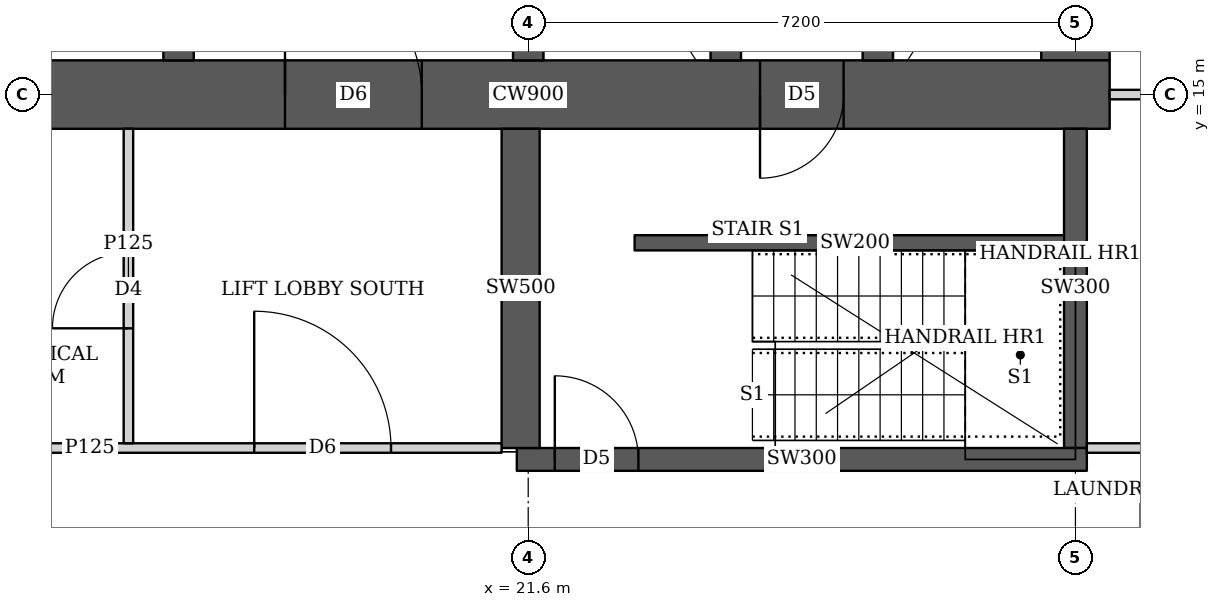
"""IFC4 building model, lengths in metres.
Left out: names, types, materials, properties, quantities, classifications, styles, units other than length and angle.
Written with IfcOpenShell. Run it as: python <this file> out.ifc"""

import sys

from ifc_helpers import new_model, si_unit, direction, frame, frame_2d, origin, place, context, subcontext, project, spatial, rectangle, extrude, element, fill, save


model = new_model("IFC4")
c1 = context("Model", 3, precision=1e-05, world=origin(), true_north=direction((0.0, 1.0)))
c2 = subcontext(c1, "Body", "Model", "MODEL_VIEW")
j1 = project(units=[si_unit("LENGTHUNIT", "METRE"), si_unit("PLANEANGLEUNIT", "RADIAN")], contexts=[c1])
p1 = place(None, origin())
s1 = spatial("IfcSite", under=j1, at=p1, CompositionType="ELEMENT")
p2 = place(p1, origin())
s2 = spatial("IfcBuilding", under=s1, at=p2, CompositionType="ELEMENT")
p3 = place(p2, frame((0.0, 0.0, 139.55)))
s3 = spatial("IfcBuildingStorey", under=s2, at=p3, CompositionType="ELEMENT", Elevation=139.55)
p4 = place(p3, frame((13.95, 15.0, 0.0), z_axis=(0.0, 0.0, 1.0), x_axis=(1.0, 0.0, 0.0)))
e1 = element("IfcWall", 1, at=p4, inside=s3, PredefinedType="SHEAR", context=c2, shape_type="SweptSolid", body=[
    extrude(rectangle(XDim=15.3, YDim=0.9, at=frame_2d((7.65, 0.0))), origin(), (0.0, 0.0, 1.0), 3.75),
])
p5 = place(p4, frame((4.45, 0.0, 0.0)))
e2 = element("IfcOpeningElement", 2, at=p5, cuts=e1, PredefinedType="OPENING", context=c2, shape_type="SweptSolid", body=[
    extrude(rectangle(XDim=1.8, YDim=2.1, at=frame_2d((0.9, 1.05))), frame((0.0, 0.46, 0.0), z_axis=(0.0, -1.0, 0.0), x_axis=(1.0, 0.0, 0.0)), (0.0, 0.0, 1.0), 0.92),
])
p6 = place(p4, frame((10.7, 0.0, 0.0)))
e3 = element("IfcOpeningElement", 3, at=p6, cuts=e1, PredefinedType="OPENING", context=c2, shape_type="SweptSolid", body=[
    extrude(rectangle(XDim=1.1, YDim=2.1, at=frame_2d((0.55, 1.05))), frame((0.0, 0.46, 0.0), z_axis=(0.0, -1.0, 0.0), x_axis=(1.0, 0.0, 0.0)), (0.0, 0.0, 1.0), 0.92),
])
p7 = place(p3, frame((28.8, 15.45, 0.0), z_axis=(0.0, 0.0, 1.0), x_axis=(0.0, 1.0, 0.0)))
e4 = element("IfcWall", 4, at=p7, inside=s3, PredefinedType="SHEAR", context=c2, shape_type="SweptSolid", body=[
    extrude(rectangle(XDim=14.1, YDim=0.9, at=frame_2d((7.05, 0.0))), origin(), (0.0, 0.0, 1.0), 3.75),
])
p8 = place(p3, frame((17.0, 15.45, 0.0), z_axis=(0.0, 0.0, 1.0), x_axis=(0.0, 1.0, 0.0)))
e5 = element("IfcWall", 5, at=p8, inside=s3, PredefinedType="SHEAR", context=c2, shape_type="SweptSolid", body=[
    extrude(rectangle(XDim=14.1, YDim=0.4, at=frame_2d((7.05, 0.0))), origin(), (0.0, 0.0, 1.0), 3.75),
])
p9 = place(p8, frame((0.925, 0.0, 0.0)))
e6 = element("IfcOpeningElement", 6, at=p9, cuts=e5, PredefinedType="OPENING", context=c2, shape_type="SweptSolid", body=[
    extrude(rectangle(XDim=1.0, YDim=2.1, at=frame_2d((0.5, 1.05))), frame((0.0, 0.21, 0.0), z_axis=(0.0, -1.0, 0.0), x_axis=(1.0, 0.0, 0.0)), (0.0, 0.0, 1.0), 0.42),
])
p10 = place(p8, frame((4.675, 0.0, 0.0)))
e7 = element("IfcOpeningElement", 7, at=p10, cuts=e5, PredefinedType="OPENING", context=c2, shape_type="SweptSolid", body=[
    extrude(rectangle(XDim=1.0, YDim=2.1, at=frame_2d((0.5, 1.05))), frame((0.0, 0.21, 0.0), z_axis=(0.0, -1.0, 0.0), x_axis=(1.0, 0.0, 0.0)), (0.0, 0.0, 1.0), 0.42),
])
p11 = place(p8, frame((8.425, 0.0, 0.0)))
e8 = element("IfcOpeningElement", 8, at=p11, cuts=e5, PredefinedType="OPENING", context=c2, shape_type="SweptSolid", body=[
    extrude(rectangle(XDim=1.0, YDim=2.1, at=frame_2d((0.5, 1.05))), frame((0.0, 0.21, 0.0), z_axis=(0.0, -1.0, 0.0), x_axis=(1.0, 0.0, 0.0)), (0.0, 0.0, 1.0), 0.42),
])
p12 = place(p8, frame((12.175, 0.0, 0.0)))
e9 = element("IfcOpeningElement", 9, at=p12, cuts=e5, PredefinedType="OPENING", context=c2, shape_type="SweptSolid", body=[
    extrude(rectangle(XDim=1.0, YDim=2.1, at=frame_2d((0.5, 1.05))), frame((0.0, 0.21, 0.0), z_axis=(0.0, -1.0, 0.0), x_axis=(1.0, 0.0, 0.0)), (0.0, 0.0, 1.0), 0.42),
])
p13 = place(p3, frame((21.6, 15.45, 0.0), z_axis=(0.0, 0.0, 1.0), x_axis=(0.0, 1.0, 0.0)))
e10 = element("IfcWall", 10, at=p13, inside=s3, PredefinedType="SHEAR", context=c2, shape_type="SweptSolid", body=[
    extrude(rectangle(XDim=14.1, YDim=0.4, at=frame_2d((7.05, 0.0))), origin(), (0.0, 0.0, 1.0), 3.75),
])
p14 = place(p13, frame((0.875, 0.0, 0.0)))
e11 = element("IfcOpeningElement", 11, at=p14, cuts=e10, PredefinedType="OPENING", context=c2, shape_type="SweptSolid", body=[
    extrude(rectangle(XDim=1.1, YDim=2.1, at=frame_2d((0.55, 1.05))), frame((0.0, 0.21, 0.0), z_axis=(0.0, -1.0, 0.0), x_axis=(1.0, 0.0, 0.0)), (0.0, 0.0, 1.0), 0.42),
])
p15 = place(p13, frame((4.625, 0.0, 0.0)))
e12 = element("IfcOpeningElement", 12, at=p15, cuts=e10, PredefinedType="OPENING", context=c2, shape_type="SweptSolid", body=[
    extrude(rectangle(XDim=1.1, YDim=2.1, at=frame_2d((0.55, 1.05))), frame((0.0, 0.21, 0.0), z_axis=(0.0, -1.0, 0.0), x_axis=(1.0, 0.0, 0.0)), (0.0, 0.0, 1.0), 0.42),
])
p16 = place(p13, frame((8.375, 0.0, 0.0)))
e13 = element("IfcOpeningElement", 13, at=p16, cuts=e10, PredefinedType="OPENING", context=c2, shape_type="SweptSolid", body=[
    extrude(rectangle(XDim=1.1, YDim=2.1, at=frame_2d((0.55, 1.05))), frame((0.0, 0.21, 0.0), z_axis=(0.0, -1.0, 0.0), x_axis=(1.0, 0.0, 0.0)), (0.0, 0.0, 1.0), 0.42),
])
p17 = place(p13, frame((12.125, 0.0, 0.0)))
e14 = element("IfcOpeningElement", 14, at=p17, cuts=e10, PredefinedType="OPENING", context=c2, shape_type="SweptSolid", body=[
    extrude(rectangle(XDim=1.1, YDim=2.1, at=frame_2d((0.55, 1.05))), frame((0.0, 0.21, 0.0), z_axis=(0.0, -1.0, 0.0), x_axis=(1.0, 0.0, 0.0)), (0.0, 0.0, 1.0), 0.42),
])
p18 = place(p3, frame((24.2, 15.45, 0.0), z_axis=(0.0, 0.0, 1.0), x_axis=(0.0, 1.0, 0.0)))
e15 = element("IfcWall", 15, at=p18, inside=s3, PredefinedType="SHEAR", context=c2, shape_type="SweptSolid", body=[
    extrude(rectangle(XDim=14.1, YDim=0.4, at=frame_2d((7.05, 0.0))), origin(), (0.0, 0.0, 1.0), 3.75),
])
p19 = place(p3, frame((26.2, 15.45, 0.0), z_axis=(0.0, 0.0, 1.0), x_axis=(0.0, 1.0, 0.0)))
e16 = element("IfcWall", 16, at=p19, inside=s3, PredefinedType="SHEAR", context=c2, shape_type="SweptSolid", body=[
    extrude(rectangle(XDim=3.1, YDim=0.4, at=frame_2d((1.55, 0.0))), origin(), (0.0, 0.0, 1.0), 3.75),
])
p20 = place(p19, frame((0.825, 0.0, 0.0)))
e17 = element("IfcOpeningElement", 17, at=p20, cuts=e16, PredefinedType="OPENING", context=c2, shape_type="SweptSolid", body=[
    extrude(rectangle(XDim=1.2, YDim=2.1, at=frame_2d((0.6, 1.05))), frame((0.0, 0.21, 0.0), z_axis=(0.0, -1.0, 0.0), x_axis=(1.0, 0.0, 0.0)), (0.0, 0.0, 1.0), 0.42),
])
p21 = place(p3, frame((21.45, 10.2, 0.0), z_axis=(0.0, 0.0, 1.0), x_axis=(1.0, 0.0, 0.0)))
e18 = element("IfcWall", 18, at=p21, inside=s3, PredefinedType="SHEAR", context=c2, shape_type="SweptSolid", body=[
    extrude(rectangle(XDim=7.5, YDim=0.3, at=frame_2d((3.75, 0.0))), origin(), (0.0, 0.0, 1.0), 3.75),
])
p22 = place(p21, frame((0.5, 0.0, 0.0)))
e19 = element("IfcOpeningElement", 19, at=p22, cuts=e18, PredefinedType="OPENING", context=c2, shape_type="SweptSolid", body=[
    extrude(rectangle(XDim=1.1, YDim=2.1, at=frame_2d((0.55, 1.05))), frame((0.0, 0.16, 0.0), z_axis=(0.0, -1.0, 0.0), x_axis=(1.0, 0.0, 0.0)), (0.0, 0.0, 1.0), 0.32),
])
p23 = place(p3, frame((21.5, 10.35, 0.0), z_axis=(0.0, 0.0, 1.0), x_axis=(0.0, 1.0, 0.0)))
e20 = element("IfcWall", 20, at=p23, inside=s3, PredefinedType="SHEAR", context=c2, shape_type="SweptSolid", body=[
    extrude(rectangle(XDim=4.2, YDim=0.5, at=frame_2d((2.1, 0.0))), origin(), (0.0, 0.0, 1.0), 3.75),
])
p24 = place(p3, frame((28.8, 10.35, 0.0), z_axis=(0.0, 0.0, 1.0), x_axis=(0.0, 1.0, 0.0)))
e21 = element("IfcWall", 21, at=p24, inside=s3, PredefinedType="SHEAR", context=c2, shape_type="SweptSolid", body=[
    extrude(rectangle(XDim=4.2, YDim=0.3, at=frame_2d((2.1, 0.0))), origin(), (0.0, 0.0, 1.0), 3.75),
])
p25 = place(p3, frame((10.413, 10.35, 0.0), z_axis=(0.0, 0.0, 1.0), x_axis=(1.0, 0.0, 0.0)))
e22 = element("IfcWall", 22, at=p25, inside=s3, PredefinedType="PARTITIONING", context=c2, shape_type="SweptSolid", body=[
    extrude(rectangle(XDim=10.837, YDim=0.125, at=frame_2d((5.418, 0.0))), origin(), (0.0, 0.0, 1.0), 3.5),
])
p26 = place(p25, frame((7.582, 0.0, 0.0)))
e23 = element("IfcOpeningElement", 23, at=p26, cuts=e22, PredefinedType="OPENING", context=c2, shape_type="SweptSolid", body=[
    extrude(rectangle(XDim=1.8, YDim=2.1, at=frame_2d((0.9, 1.05))), frame((0.0, 0.073, 0.0), z_axis=(0.0, -1.0, 0.0), x_axis=(1.0, 0.0, 0.0)), (0.0, 0.0, 1.0), 0.145),
])
p27 = place(p3, frame((16.34, 10.413, 0.0), z_axis=(0.0, 0.0, 1.0), x_axis=(0.0, 1.0, 0.0)))
e24 = element("IfcWall", 24, at=p27, inside=s3, PredefinedType="PARTITIONING", context=c2, shape_type="SweptSolid", body=[
    extrude(rectangle(XDim=4.137, YDim=0.125, at=frame_2d((2.068, 0.0))), origin(), (0.0, 0.0, 1.0), 3.5),
])
p28 = place(p27, frame((1.512, 0.0, 0.0)))
e25 = element("IfcOpeningElement", 25, at=p28, cuts=e24, PredefinedType="OPENING", context=c2, shape_type="SweptSolid", body=[
    extrude(rectangle(XDim=1.0, YDim=2.1, at=frame_2d((0.5, 1.05))), frame((0.0, 0.073, 0.0), z_axis=(0.0, -1.0, 0.0), x_axis=(1.0, 0.0, 0.0)), (0.0, 0.0, 1.0), 0.145),
])
p29 = place(p3, frame((28.95, 10.35, 0.0), z_axis=(0.0, 0.0, 1.0), x_axis=(1.0, 0.0, 0.0)))
e26 = element("IfcWall", 26, at=p29, inside=s3, PredefinedType="PARTITIONING", context=c2, shape_type="SweptSolid", body=[
    extrude(rectangle(XDim=9.013, YDim=0.125, at=frame_2d((4.506, 0.0))), origin(), (0.0, 0.0, 1.0), 3.5),
])
p30 = place(p3, frame((29.25, 15.0, 0.0), z_axis=(0.0, 0.0, 1.0), x_axis=(1.0, 0.0, 0.0)))
e27 = element("IfcWall", 27, at=p30, inside=s3, PredefinedType="PARTITIONING", context=c2, shape_type="SweptSolid", body=[
    extrude(rectangle(XDim=5.176, YDim=0.125, at=frame_2d((2.588, 0.0))), origin(), (0.0, 0.0, 1.0), 3.5),
])
p31 = place(p3, frame((23.0, 13.05, 0.0), z_axis=(0.0, 0.0, 1.0), x_axis=(1.0, 0.0, 0.0)))
e28 = element("IfcWall", 28, at=p31, inside=s3, PredefinedType="SHEAR", context=c2, shape_type="SweptSolid", body=[
    extrude(rectangle(XDim=5.8, YDim=0.2, at=frame_2d((2.9, 0.0))), origin(), (0.0, 0.0, 1.0), 3.75),
])
p32 = place(p28, origin())
e29 = element("IfcDoor", 29, at=p32, inside=s3, OperationType="SINGLE_SWING_LEFT", PredefinedType="DOOR", context=c2, shape_type="SweptSolid", body=[
    extrude(rectangle(XDim=1.0, YDim=2.1, at=frame_2d((0.5, 1.05))), frame((0.0, 0.025, 0.0), z_axis=(0.0, -1.0, 0.0), x_axis=(1.0, 0.0, 0.0)), (0.0, 0.0, 1.0), 0.05),
])
fill(e25, e29)
p33 = place(p26, origin())
e30 = element("IfcDoor", 30, at=p33, inside=s3, OperationType="DOUBLE_DOOR_SINGLE_SWING", PredefinedType="DOOR", context=c2, shape_type="SweptSolid", body=[
    extrude(rectangle(XDim=1.8, YDim=2.1, at=frame_2d((0.9, 1.05))), frame((0.0, 0.025, 0.0), z_axis=(0.0, -1.0, 0.0), x_axis=(1.0, 0.0, 0.0)), (0.0, 0.0, 1.0), 0.05),
])
fill(e23, e30)
p34 = place(p5, origin())
e31 = element("IfcDoor", 31, at=p34, inside=s3, OperationType="DOUBLE_DOOR_SINGLE_SWING", PredefinedType="DOOR", context=c2, shape_type="SweptSolid", body=[
    extrude(rectangle(XDim=1.8, YDim=2.1, at=frame_2d((0.9, 1.05))), frame((0.0, 0.025, 0.0), z_axis=(0.0, -1.0, 0.0), x_axis=(1.0, 0.0, 0.0)), (0.0, 0.0, 1.0), 0.05),
])
fill(e2, e31)
p35 = place(p6, origin())
e32 = element("IfcDoor", 32, at=p35, inside=s3, OperationType="SINGLE_SWING_RIGHT", PredefinedType="DOOR", context=c2, shape_type="SweptSolid", body=[
    extrude(rectangle(XDim=1.1, YDim=2.1, at=frame_2d((0.55, 1.05))), frame((0.0, 0.025, 0.0), z_axis=(0.0, -1.0, 0.0), x_axis=(1.0, 0.0, 0.0)), (0.0, 0.0, 1.0), 0.05),
])
fill(e3, e32)
p36 = place(p22, origin())
e33 = element("IfcDoor", 33, at=p36, inside=s3, OperationType="SINGLE_SWING_LEFT", PredefinedType="DOOR", context=c2, shape_type="SweptSolid", body=[
    extrude(rectangle(XDim=1.1, YDim=2.1, at=frame_2d((0.55, 1.05))), frame((0.0, 0.025, 0.0), z_axis=(0.0, -1.0, 0.0), x_axis=(1.0, 0.0, 0.0)), (0.0, 0.0, 1.0), 0.05),
])
fill(e19, e33)
save(model, sys.argv[1])
